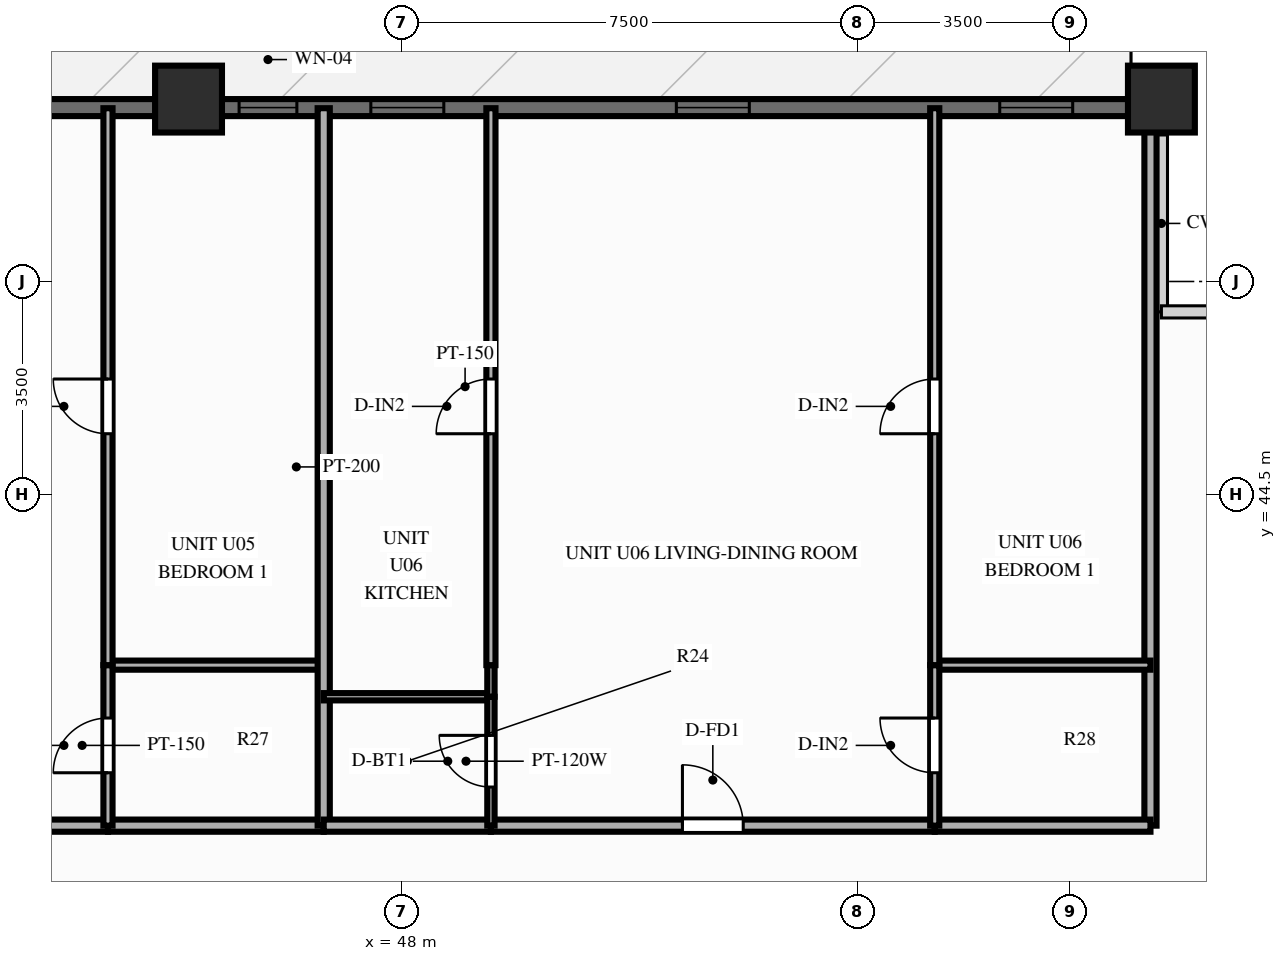
"""IFC4 building model, lengths in metres.
Left out: names, types, materials, properties, quantities, classifications, styles, units other than length and angle.
Written with IfcOpenShell. Run it as: python <this file> out.ifc"""

import sys

from ifc_helpers import new_model, si_unit, direction, frame, frame_2d, origin, origin_2d, place, context, subcontext, project, spatial, rectangle, extrude, source, transform, mapped, element, fill, save


model = new_model("IFC4")
c1 = context("Model", 3, precision=1e-05, world=origin(), true_north=direction((0.0, 1.0)))
c2 = subcontext(c1, "Body", "Model", "MODEL_VIEW")
j1 = project(units=[si_unit("LENGTHUNIT", "METRE"), si_unit("PLANEANGLEUNIT", "RADIAN")], contexts=[c1])
p1 = place(None, origin())
s1 = spatial("IfcSite", under=j1, at=p1, CompositionType="ELEMENT")
p2 = place(p1, origin())
s2 = spatial("IfcBuilding", under=s1, at=p2, CompositionType="ELEMENT")
p3 = place(p2, frame((0.0, 0.0, 52.4)))
s3 = spatial("IfcBuildingStorey", under=s2, at=p3, CompositionType="ELEMENT", Elevation=52.4)
m1 = source(origin(), c2, "Body", "SweptSolid", [
    extrude(rectangle(XDim=1.1, YDim=1.1, at=origin_2d()), origin(), (0.0, 0.0, 1.0), 3.0),
])
for number, where, z_axis, x_axis in (
    (1, (60.5, 51.0, 0.0), (0.0, 0.0, 1.0), (1.0, 0.0, 0.0)),
    (2, (44.5, 51.0, 0.0), (0.0, 0.0, 1.0), (1.0, 0.0, 0.0)),
):
    element("IfcColumn", number, at=place(p3, frame(where, z_axis=z_axis, x_axis=x_axis)), inside=s3, PredefinedType="COLUMN", context=c2, shape_type="MappedRepresentation", body=[
        mapped(m1, transform((0.0, 0.0, 0.0), scale=1.0)),
    ])
p4 = place(p3, frame((15.5, 50.86, 0.0), z_axis=(0.0, 0.0, 1.0), x_axis=(1.0, 0.0, 0.0)))
e3 = element("IfcWall", 3, at=p4, inside=s3, PredefinedType="SOLIDWALL", context=c2, shape_type="SweptSolid", body=[
    extrude(rectangle(XDim=45.0, YDim=0.28, at=frame_2d((22.5, 0.0))), origin(), (0.0, 0.0, 1.0), 2.28),
])
p5 = place(p4, frame((0.76, 0.0, 0.25)))
e4 = element("IfcOpeningElement", 4, at=p5, cuts=e3, PredefinedType="OPENING", context=c2, shape_type="SweptSolid", body=[
    extrude(rectangle(XDim=1.2, YDim=1.5, at=frame_2d((0.6, 0.75))), frame((0.0, 0.152, 0.0), z_axis=(0.0, -1.0, 0.0), x_axis=(1.0, 0.0, 0.0)), (0.0, 0.0, 1.0), 0.304),
])
p6 = place(p4, frame((2.83, 0.0, 0.25)))
e5 = element("IfcOpeningElement", 5, at=p6, cuts=e3, PredefinedType="OPENING", context=c2, shape_type="SweptSolid", body=[
    extrude(rectangle(XDim=1.2, YDim=1.5, at=frame_2d((0.6, 0.75))), frame((0.0, 0.152, 0.0), z_axis=(0.0, -1.0, 0.0), x_axis=(1.0, 0.0, 0.0)), (0.0, 0.0, 1.0), 0.304),
])
p7 = place(p4, frame((5.135, 0.0, 0.25)))
e6 = element("IfcOpeningElement", 6, at=p7, cuts=e3, PredefinedType="OPENING", context=c2, shape_type="SweptSolid", body=[
    extrude(rectangle(XDim=1.2, YDim=1.5, at=frame_2d((0.6, 0.75))), frame((0.0, 0.152, 0.0), z_axis=(0.0, -1.0, 0.0), x_axis=(1.0, 0.0, 0.0)), (0.0, 0.0, 1.0), 0.304),
])
p8 = place(p4, frame((7.753, 0.0, 0.25)))
e7 = element("IfcOpeningElement", 7, at=p8, cuts=e3, PredefinedType="OPENING", context=c2, shape_type="SweptSolid", body=[
    extrude(rectangle(XDim=1.2, YDim=1.5, at=frame_2d((0.6, 0.75))), frame((0.0, 0.152, 0.0), z_axis=(0.0, -1.0, 0.0), x_axis=(1.0, 0.0, 0.0)), (0.0, 0.0, 1.0), 0.304),
])
p9 = place(p4, frame((10.266, 0.0, 0.25)))
e8 = element("IfcOpeningElement", 8, at=p9, cuts=e3, PredefinedType="OPENING", context=c2, shape_type="SweptSolid", body=[
    extrude(rectangle(XDim=1.2, YDim=1.5, at=frame_2d((0.6, 0.75))), frame((0.0, 0.152, 0.0), z_axis=(0.0, -1.0, 0.0), x_axis=(1.0, 0.0, 0.0)), (0.0, 0.0, 1.0), 0.304),
])
p10 = place(p4, frame((12.571, 0.0, 0.25)))
e9 = element("IfcOpeningElement", 9, at=p10, cuts=e3, PredefinedType="OPENING", context=c2, shape_type="SweptSolid", body=[
    extrude(rectangle(XDim=1.2, YDim=1.5, at=frame_2d((0.6, 0.75))), frame((0.0, 0.152, 0.0), z_axis=(0.0, -1.0, 0.0), x_axis=(1.0, 0.0, 0.0)), (0.0, 0.0, 1.0), 0.304),
])
p11 = place(p4, frame((14.643, 0.0, 0.25)))
e10 = element("IfcOpeningElement", 10, at=p11, cuts=e3, PredefinedType="OPENING", context=c2, shape_type="SweptSolid", body=[
    extrude(rectangle(XDim=0.7, YDim=1.5, at=frame_2d((0.35, 0.75))), frame((0.0, 0.152, 0.0), z_axis=(0.0, -1.0, 0.0), x_axis=(1.0, 0.0, 0.0)), (0.0, 0.0, 1.0), 0.304),
])
p12 = place(p4, frame((17.977, 0.0, 0.25)))
e11 = element("IfcOpeningElement", 11, at=p12, cuts=e3, PredefinedType="OPENING", context=c2, shape_type="SweptSolid", body=[
    extrude(rectangle(XDim=1.2, YDim=1.5, at=frame_2d((0.6, 0.75))), frame((0.0, 0.152, 0.0), z_axis=(0.0, -1.0, 0.0), x_axis=(1.0, 0.0, 0.0)), (0.0, 0.0, 1.0), 0.304),
])
p13 = place(p4, frame((23.263, 0.0, 0.0)))
e12 = element("IfcOpeningElement", 12, at=p13, cuts=e3, PredefinedType="OPENING", context=c2, shape_type="SweptSolid", body=[
    extrude(rectangle(XDim=1.1, YDim=2.15, at=frame_2d((0.55, 1.075))), frame((0.0, 0.152, 0.0), z_axis=(0.0, -1.0, 0.0), x_axis=(1.0, 0.0, 0.0)), (0.0, 0.0, 1.0), 0.304),
])
p14 = place(p4, frame((29.832, 0.0, 0.25)))
e13 = element("IfcOpeningElement", 13, at=p14, cuts=e3, PredefinedType="OPENING", context=c2, shape_type="SweptSolid", body=[
    extrude(rectangle(XDim=0.95, YDim=1.5, at=frame_2d((0.475, 0.75))), frame((0.0, 0.152, 0.0), z_axis=(0.0, -1.0, 0.0), x_axis=(1.0, 0.0, 0.0)), (0.0, 0.0, 1.0), 0.304),
])
p15 = place(p4, frame((31.998, 0.0, 0.25)))
e14 = element("IfcOpeningElement", 14, at=p15, cuts=e3, PredefinedType="OPENING", context=c2, shape_type="SweptSolid", body=[
    extrude(rectangle(XDim=1.2, YDim=1.5, at=frame_2d((0.6, 0.75))), frame((0.0, 0.152, 0.0), z_axis=(0.0, -1.0, 0.0), x_axis=(1.0, 0.0, 0.0)), (0.0, 0.0, 1.0), 0.304),
])
p16 = place(p4, frame((37.023, 0.0, 0.25)))
e15 = element("IfcOpeningElement", 15, at=p16, cuts=e3, PredefinedType="OPENING", context=c2, shape_type="SweptSolid", body=[
    extrude(rectangle(XDim=1.2, YDim=1.5, at=frame_2d((0.6, 0.75))), frame((0.0, 0.152, 0.0), z_axis=(0.0, -1.0, 0.0), x_axis=(1.0, 0.0, 0.0)), (0.0, 0.0, 1.0), 0.304),
])
p17 = place(p4, frame((42.341, 0.0, 0.25)))
e16 = element("IfcOpeningElement", 16, at=p17, cuts=e3, PredefinedType="OPENING", context=c2, shape_type="SweptSolid", body=[
    extrude(rectangle(XDim=1.2, YDim=1.5, at=frame_2d((0.6, 0.75))), frame((0.0, 0.152, 0.0), z_axis=(0.0, -1.0, 0.0), x_axis=(1.0, 0.0, 0.0)), (0.0, 0.0, 1.0), 0.304),
])
p18 = place(p3, frame((60.32, 39.05, 0.0), z_axis=(0.0, 0.0, 1.0), x_axis=(0.0, 1.0, 0.0)))
e17 = element("IfcWall", 17, at=p18, inside=s3, PredefinedType="PARTITIONING", context=c2, shape_type="SweptSolid", body=[
    extrude(rectangle(XDim=11.8, YDim=0.2, at=frame_2d((5.9, 0.0))), origin(), (0.0, 0.0, 1.0), 2.79),
])
p19 = place(p3, frame((35.451, 39.05, 0.0), z_axis=(0.0, 0.0, 1.0), x_axis=(1.0, 0.0, 0.0)))
e18 = element("IfcWall", 18, at=p19, inside=s3, PredefinedType="PARTITIONING", context=c2, shape_type="SweptSolid", body=[
    extrude(rectangle(XDim=7.724, YDim=0.2, at=frame_2d((3.862, 0.0))), origin(), (0.0, 0.0, 1.0), 2.79),
])
p20 = place(p19, frame((3.362, 0.0, 0.0)))
e19 = element("IfcOpeningElement", 19, at=p20, cuts=e18, PredefinedType="OPENING", context=c2, shape_type="SweptSolid", body=[
    extrude(rectangle(XDim=1.0, YDim=2.15, at=frame_2d((0.5, 1.075))), frame((0.0, 0.112, 0.0), z_axis=(0.0, -1.0, 0.0), x_axis=(1.0, 0.0, 0.0)), (0.0, 0.0, 1.0), 0.224),
])
p21 = place(p3, frame((43.175, 39.05, 0.0), z_axis=(0.0, 0.0, 1.0), x_axis=(1.0, 0.0, 0.0)))
e20 = element("IfcWall", 20, at=p21, inside=s3, PredefinedType="PARTITIONING", context=c2, shape_type="SweptSolid", body=[
    extrude(rectangle(XDim=3.548, YDim=0.2, at=frame_2d((1.774, 0.0))), origin(), (0.0, 0.0, 1.0), 2.79),
])
p22 = place(p3, frame((43.175, 41.69, 0.0), z_axis=(0.0, 0.0, 1.0), x_axis=(1.0, 0.0, 0.0)))
e21 = element("IfcWall", 21, at=p22, inside=s3, PredefinedType="PARTITIONING", context=c2, shape_type="SweptSolid", body=[
    extrude(rectangle(XDim=3.548, YDim=0.15, at=frame_2d((1.774, 0.0))), origin(), (0.0, 0.0, 1.0), 2.79),
])
p23 = place(p3, frame((43.175, 39.05, 0.0), z_axis=(0.0, 0.0, 1.0), x_axis=(0.0, 1.0, 0.0)))
e22 = element("IfcWall", 22, at=p23, inside=s3, PredefinedType="PARTITIONING", context=c2, shape_type="SweptSolid", body=[
    extrude(rectangle(XDim=2.64, YDim=0.15, at=frame_2d((1.32, 0.0))), origin(), (0.0, 0.0, 1.0), 2.79),
])
p24 = place(p23, frame((0.87, 0.0, 0.0)))
e23 = element("IfcOpeningElement", 23, at=p24, cuts=e22, PredefinedType="OPENING", context=c2, shape_type="SweptSolid", body=[
    extrude(rectangle(XDim=0.9, YDim=2.1, at=frame_2d((0.45, 1.05))), frame((0.0, 0.087, 0.0), z_axis=(0.0, -1.0, 0.0), x_axis=(1.0, 0.0, 0.0)), (0.0, 0.0, 1.0), 0.174),
])
p25 = place(p3, frame((43.175, 41.69, 0.0), z_axis=(0.0, 0.0, 1.0), x_axis=(0.0, 1.0, 0.0)))
e24 = element("IfcWall", 24, at=p25, inside=s3, PredefinedType="PARTITIONING", context=c2, shape_type="SweptSolid", body=[
    extrude(rectangle(XDim=9.16, YDim=0.15, at=frame_2d((4.58, 0.0))), origin(), (0.0, 0.0, 1.0), 2.79),
])
p26 = place(p25, frame((3.806, 0.0, 0.0)))
e25 = element("IfcOpeningElement", 25, at=p26, cuts=e24, PredefinedType="OPENING", context=c2, shape_type="SweptSolid", body=[
    extrude(rectangle(XDim=0.9, YDim=2.1, at=frame_2d((0.45, 1.05))), frame((0.0, 0.087, 0.0), z_axis=(0.0, -1.0, 0.0), x_axis=(1.0, 0.0, 0.0)), (0.0, 0.0, 1.0), 0.174),
])
p27 = place(p3, frame((46.723, 39.05, 0.0), z_axis=(0.0, 0.0, 1.0), x_axis=(0.0, 1.0, 0.0)))
e26 = element("IfcWall", 26, at=p27, inside=s3, PredefinedType="PARTITIONING", context=c2, shape_type="SweptSolid", body=[
    extrude(rectangle(XDim=11.8, YDim=0.2, at=frame_2d((5.9, 0.0))), origin(), (0.0, 0.0, 1.0), 2.79),
])
p28 = place(p3, frame((46.723, 39.05, 0.0), z_axis=(0.0, 0.0, 1.0), x_axis=(1.0, 0.0, 0.0)))
e27 = element("IfcWall", 27, at=p28, inside=s3, PredefinedType="PARTITIONING", context=c2, shape_type="SweptSolid", body=[
    extrude(rectangle(XDim=2.75, YDim=0.2, at=frame_2d((1.375, 0.0))), origin(), (0.0, 0.0, 1.0), 2.79),
])
p29 = place(p3, frame((49.473, 39.05, 0.0), z_axis=(0.0, 0.0, 1.0), x_axis=(1.0, 0.0, 0.0)))
e28 = element("IfcWall", 28, at=p29, inside=s3, PredefinedType="PARTITIONING", context=c2, shape_type="SweptSolid", body=[
    extrude(rectangle(XDim=7.299, YDim=0.2, at=frame_2d((3.649, 0.0))), origin(), (0.0, 0.0, 1.0), 2.79),
])
p30 = place(p29, frame((3.149, 0.0, 0.0)))
e29 = element("IfcOpeningElement", 29, at=p30, cuts=e28, PredefinedType="OPENING", context=c2, shape_type="SweptSolid", body=[
    extrude(rectangle(XDim=1.0, YDim=2.15, at=frame_2d((0.5, 1.075))), frame((0.0, 0.112, 0.0), z_axis=(0.0, -1.0, 0.0), x_axis=(1.0, 0.0, 0.0)), (0.0, 0.0, 1.0), 0.224),
])
p31 = place(p3, frame((56.772, 39.05, 0.0), z_axis=(0.0, 0.0, 1.0), x_axis=(1.0, 0.0, 0.0)))
e30 = element("IfcWall", 30, at=p31, inside=s3, PredefinedType="PARTITIONING", context=c2, shape_type="SweptSolid", body=[
    extrude(rectangle(XDim=3.548, YDim=0.2, at=frame_2d((1.774, 0.0))), origin(), (0.0, 0.0, 1.0), 2.79),
])
p32 = place(p3, frame((46.723, 41.17, 0.0), z_axis=(0.0, 0.0, 1.0), x_axis=(1.0, 0.0, 0.0)))
e31 = element("IfcWall", 31, at=p32, inside=s3, PredefinedType="PARTITIONING", context=c2, shape_type="SweptSolid", body=[
    extrude(rectangle(XDim=2.75, YDim=0.12, at=frame_2d((1.375, 0.0))), origin(), (0.0, 0.0, 1.0), 2.79),
])
p33 = place(p3, frame((56.772, 41.69, 0.0), z_axis=(0.0, 0.0, 1.0), x_axis=(1.0, 0.0, 0.0)))
e32 = element("IfcWall", 32, at=p33, inside=s3, PredefinedType="PARTITIONING", context=c2, shape_type="SweptSolid", body=[
    extrude(rectangle(XDim=3.548, YDim=0.15, at=frame_2d((1.774, 0.0))), origin(), (0.0, 0.0, 1.0), 2.79),
])
p34 = place(p3, frame((49.473, 39.05, 0.0), z_axis=(0.0, 0.0, 1.0), x_axis=(0.0, 1.0, 0.0)))
e33 = element("IfcWall", 33, at=p34, inside=s3, PredefinedType="PARTITIONING", context=c2, shape_type="SweptSolid", body=[
    extrude(rectangle(XDim=2.12, YDim=0.12, at=frame_2d((1.06, 0.0))), origin(), (0.0, 0.0, 1.0), 2.79),
])
p35 = place(p34, frame((0.635, 0.0, 0.0)))
e34 = element("IfcOpeningElement", 34, at=p35, cuts=e33, PredefinedType="OPENING", context=c2, shape_type="SweptSolid", body=[
    extrude(rectangle(XDim=0.85, YDim=2.05, at=frame_2d((0.425, 1.025))), frame((0.0, 0.072, 0.0), z_axis=(0.0, -1.0, 0.0), x_axis=(1.0, 0.0, 0.0)), (0.0, 0.0, 1.0), 0.144),
])
p36 = place(p3, frame((49.473, 41.17, 0.0), z_axis=(0.0, 0.0, 1.0), x_axis=(0.0, 1.0, 0.0)))
e35 = element("IfcWall", 35, at=p36, inside=s3, PredefinedType="PARTITIONING", context=c2, shape_type="SweptSolid", body=[
    extrude(rectangle(XDim=0.52, YDim=0.12, at=frame_2d((0.26, 0.0))), origin(), (0.0, 0.0, 1.0), 2.79),
])
p37 = place(p3, frame((49.473, 41.69, 0.0), z_axis=(0.0, 0.0, 1.0), x_axis=(0.0, 1.0, 0.0)))
e36 = element("IfcWall", 36, at=p37, inside=s3, PredefinedType="PARTITIONING", context=c2, shape_type="SweptSolid", body=[
    extrude(rectangle(XDim=9.16, YDim=0.15, at=frame_2d((4.58, 0.0))), origin(), (0.0, 0.0, 1.0), 2.79),
])
p38 = place(p37, frame((3.806, 0.0, 0.0)))
e37 = element("IfcOpeningElement", 37, at=p38, cuts=e36, PredefinedType="OPENING", context=c2, shape_type="SweptSolid", body=[
    extrude(rectangle(XDim=0.9, YDim=2.1, at=frame_2d((0.45, 1.05))), frame((0.0, 0.087, 0.0), z_axis=(0.0, -1.0, 0.0), x_axis=(1.0, 0.0, 0.0)), (0.0, 0.0, 1.0), 0.174),
])
p39 = place(p3, frame((56.772, 39.05, 0.0), z_axis=(0.0, 0.0, 1.0), x_axis=(0.0, 1.0, 0.0)))
e38 = element("IfcWall", 38, at=p39, inside=s3, PredefinedType="PARTITIONING", context=c2, shape_type="SweptSolid", body=[
    extrude(rectangle(XDim=2.64, YDim=0.15, at=frame_2d((1.32, 0.0))), origin(), (0.0, 0.0, 1.0), 2.79),
])
p40 = place(p39, frame((0.87, 0.0, 0.0)))
e39 = element("IfcOpeningElement", 39, at=p40, cuts=e38, PredefinedType="OPENING", context=c2, shape_type="SweptSolid", body=[
    extrude(rectangle(XDim=0.9, YDim=2.1, at=frame_2d((0.45, 1.05))), frame((0.0, 0.087, 0.0), z_axis=(0.0, -1.0, 0.0), x_axis=(1.0, 0.0, 0.0)), (0.0, 0.0, 1.0), 0.174),
])
p41 = place(p3, frame((56.772, 41.69, 0.0), z_axis=(0.0, 0.0, 1.0), x_axis=(0.0, 1.0, 0.0)))
e40 = element("IfcWall", 40, at=p41, inside=s3, PredefinedType="PARTITIONING", context=c2, shape_type="SweptSolid", body=[
    extrude(rectangle(XDim=9.16, YDim=0.15, at=frame_2d((4.58, 0.0))), origin(), (0.0, 0.0, 1.0), 2.79),
])
p42 = place(p41, frame((3.806, 0.0, 0.0)))
e41 = element("IfcOpeningElement", 41, at=p42, cuts=e40, PredefinedType="OPENING", context=c2, shape_type="SweptSolid", body=[
    extrude(rectangle(XDim=0.9, YDim=2.1, at=frame_2d((0.45, 1.05))), frame((0.0, 0.087, 0.0), z_axis=(0.0, -1.0, 0.0), x_axis=(1.0, 0.0, 0.0)), (0.0, 0.0, 1.0), 0.174),
])
m2 = source(origin(), c2, "Body", "SweptSolid", [
    extrude(rectangle(XDim=0.95, YDim=1.5, at=frame_2d((0.475, 0.75))), frame((0.0, 0.03, 0.0), z_axis=(0.0, -1.0, 0.0), x_axis=(1.0, 0.0, 0.0)), (0.0, 0.0, 1.0), 0.06),
])
p43 = place(p14, origin())
e42 = element("IfcWindow", 42, at=p43, inside=s3, PartitioningType="SINGLE_PANEL", PredefinedType="WINDOW", context=c2, shape_type="MappedRepresentation", body=[
    mapped(m2, transform((0.0, 0.0, 0.0), scale=1.0)),
])
fill(e13, e42)
m3 = source(origin(), c2, "Body", "SweptSolid", [
    extrude(rectangle(XDim=1.2, YDim=1.5, at=frame_2d((0.6, 0.75))), frame((0.0, 0.03, 0.0), z_axis=(0.0, -1.0, 0.0), x_axis=(1.0, 0.0, 0.0)), (0.0, 0.0, 1.0), 0.06),
])
p44 = place(p15, origin())
e43 = element("IfcWindow", 43, at=p44, inside=s3, PartitioningType="SINGLE_PANEL", PredefinedType="WINDOW", context=c2, shape_type="MappedRepresentation", body=[
    mapped(m3, transform((0.0, 0.0, 0.0), scale=1.0)),
])
fill(e14, e43)
p45 = place(p16, origin())
e44 = element("IfcWindow", 44, at=p45, inside=s3, PartitioningType="SINGLE_PANEL", PredefinedType="WINDOW", context=c2, shape_type="MappedRepresentation", body=[
    mapped(m3, transform((0.0, 0.0, 0.0), scale=1.0)),
])
fill(e15, e44)
p46 = place(p17, origin())
e45 = element("IfcWindow", 45, at=p46, inside=s3, PartitioningType="SINGLE_PANEL", PredefinedType="WINDOW", context=c2, shape_type="MappedRepresentation", body=[
    mapped(m3, transform((0.0, 0.0, 0.0), scale=1.0)),
])
fill(e16, e45)
m4 = source(origin(), c2, "Body", "SweptSolid", [
    extrude(rectangle(XDim=0.9, YDim=2.1, at=frame_2d((0.45, 1.05))), frame((0.0, 0.025, 0.0), z_axis=(0.0, -1.0, 0.0), x_axis=(1.0, 0.0, 0.0)), (0.0, 0.0, 1.0), 0.05),
])
p47 = place(p24, origin())
e46 = element("IfcDoor", 46, at=p47, inside=s3, OperationType="SINGLE_SWING_LEFT", PredefinedType="DOOR", context=c2, shape_type="MappedRepresentation", body=[
    mapped(m4, transform((0.0, 0.0, 0.0), scale=1.0)),
])
fill(e23, e46)
p48 = place(p26, origin())
e47 = element("IfcDoor", 47, at=p48, inside=s3, OperationType="SINGLE_SWING_RIGHT", PredefinedType="DOOR", context=c2, shape_type="MappedRepresentation", body=[
    mapped(m4, transform((0.0, 0.0, 0.0), scale=1.0)),
])
fill(e25, e47)
m5 = source(origin(), c2, "Body", "SweptSolid", [
    extrude(rectangle(XDim=1.0, YDim=2.15, at=frame_2d((0.5, 1.075))), frame((0.0, 0.025, 0.0), z_axis=(0.0, -1.0, 0.0), x_axis=(1.0, 0.0, 0.0)), (0.0, 0.0, 1.0), 0.05),
])
p49 = place(p30, origin())
e48 = element("IfcDoor", 48, at=p49, inside=s3, OperationType="SINGLE_SWING_LEFT", PredefinedType="DOOR", context=c2, shape_type="MappedRepresentation", body=[
    mapped(m5, transform((0.0, 0.0, 0.0), scale=1.0)),
])
fill(e29, e48)
m6 = source(origin(), c2, "Body", "SweptSolid", [
    extrude(rectangle(XDim=0.85, YDim=2.05, at=frame_2d((0.425, 1.025))), frame((0.0, 0.025, 0.0), z_axis=(0.0, -1.0, 0.0), x_axis=(1.0, 0.0, 0.0)), (0.0, 0.0, 1.0), 0.05),
])
p50 = place(p35, origin())
e49 = element("IfcDoor", 49, at=p50, inside=s3, OperationType="SINGLE_SWING_RIGHT", PredefinedType="DOOR", context=c2, shape_type="MappedRepresentation", body=[
    mapped(m6, transform((0.0, 0.0, 0.0), scale=1.0)),
])
fill(e34, e49)
p51 = place(p38, origin())
e50 = element("IfcDoor", 50, at=p51, inside=s3, OperationType="SINGLE_SWING_LEFT", PredefinedType="DOOR", context=c2, shape_type="MappedRepresentation", body=[
    mapped(m4, transform((0.0, 0.0, 0.0), scale=1.0)),
])
fill(e37, e50)
p52 = place(p40, origin())
e51 = element("IfcDoor", 51, at=p52, inside=s3, OperationType="SINGLE_SWING_RIGHT", PredefinedType="DOOR", context=c2, shape_type="MappedRepresentation", body=[
    mapped(m4, transform((0.0, 0.0, 0.0), scale=1.0)),
])
fill(e39, e51)
p53 = place(p42, origin())
e52 = element("IfcDoor", 52, at=p53, inside=s3, OperationType="SINGLE_SWING_LEFT", PredefinedType="DOOR", context=c2, shape_type="MappedRepresentation", body=[
    mapped(m4, transform((0.0, 0.0, 0.0), scale=1.0)),
])
fill(e41, e52)
save(model, sys.argv[1])
